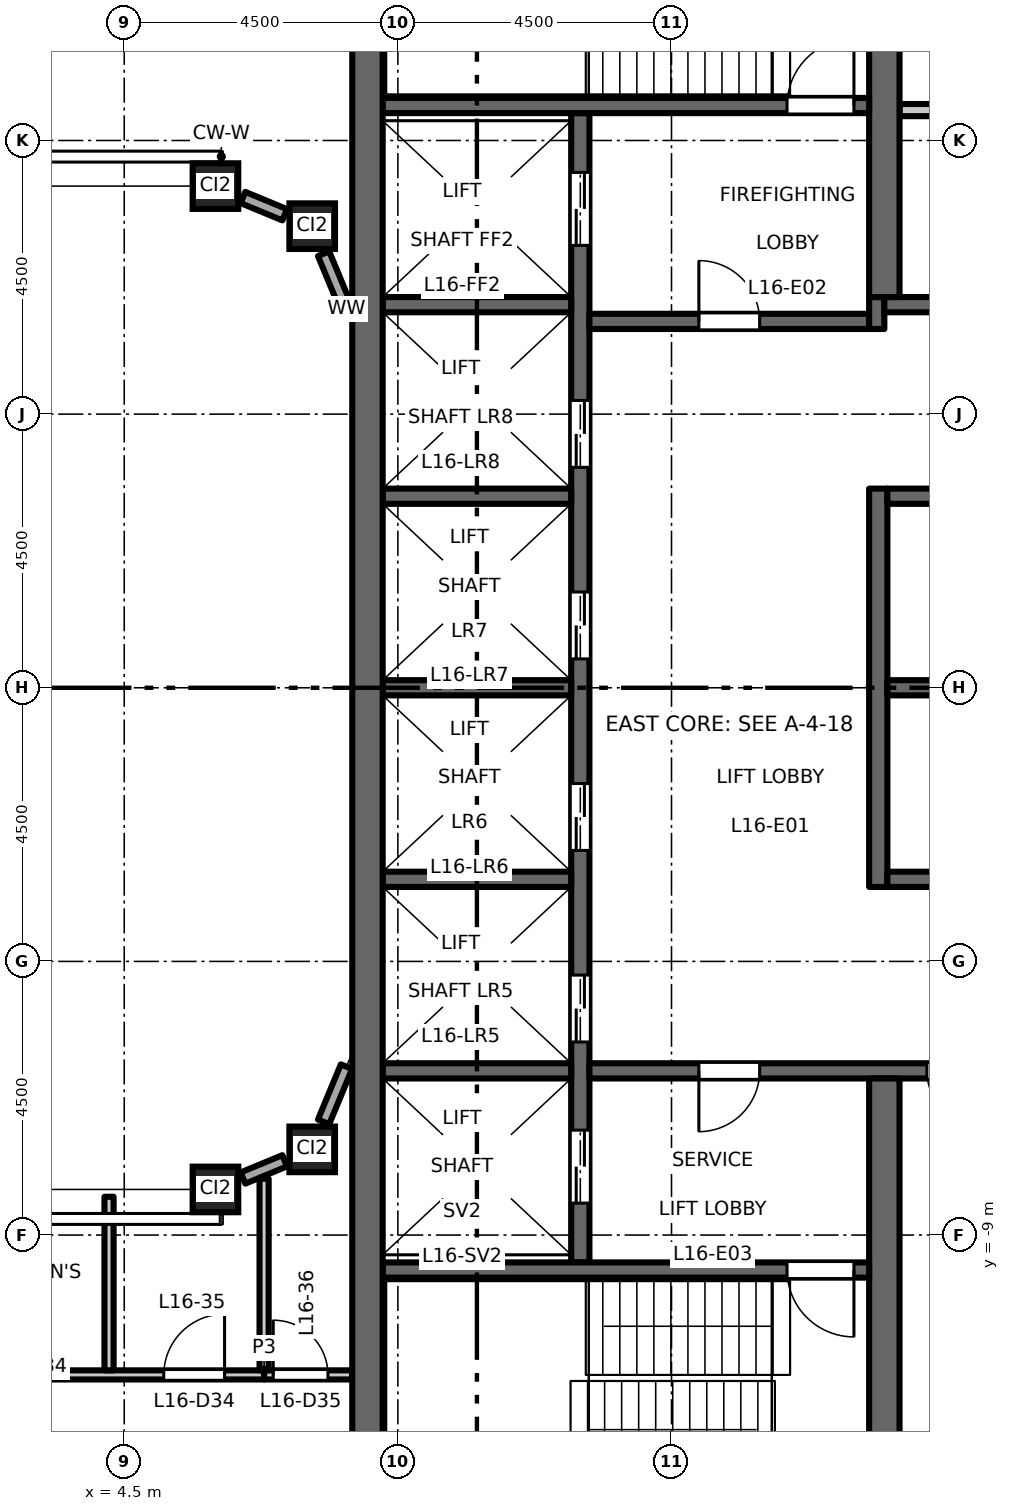
"""IFC4 building model, lengths in metres.
Left out: names, types, materials, properties, quantities, classifications, styles, units other than length and angle.
Written with IfcOpenShell. Run it as: python <this file> out.ifc"""

import sys

from ifc_helpers import new_model, si_unit, direction, frame, frame_2d, origin, origin_2d, place, context, subcontext, project, spatial, rectangle, hollow_rectangle, extrude, element, fill, save


model = new_model("IFC4")
c1 = context("Model", 3, precision=1e-05, world=origin(), true_north=direction((0.0, 1.0)))
c2 = subcontext(c1, "Body", "Model", "MODEL_VIEW")
j1 = project(units=[si_unit("LENGTHUNIT", "METRE"), si_unit("PLANEANGLEUNIT", "RADIAN")], contexts=[c1])
p1 = place(None, origin())
s1 = spatial("IfcSite", under=j1, at=p1, CompositionType="ELEMENT")
p2 = place(p1, origin())
s2 = spatial("IfcBuilding", under=s1, at=p2, CompositionType="ELEMENT")
p3 = place(p2, frame((0.0, 0.0, 76.2)))
s3 = spatial("IfcBuildingStorey", under=s2, at=p3, CompositionType="ELEMENT", Elevation=76.2)
for number, where, z_axis, x_axis in (
    (1, (6.0, -8.25, 0.0), (0.0, 0.0, 1.0), (1.0, 0.0, 0.0)),
    (2, (7.591, -7.591, 0.0), (0.0, 0.0, 1.0), (1.0, 0.0, 0.0)),
    (3, (6.0, 8.25, 0.0), (0.0, 0.0, 1.0), (1.0, 0.0, 0.0)),
    (4, (7.591, 7.591, 0.0), (0.0, 0.0, 1.0), (1.0, 0.0, 0.0)),
):
    element("IfcColumn", number, at=place(p3, frame(where, z_axis=z_axis, x_axis=x_axis)), inside=s3, PredefinedType="COLUMN", context=c2, shape_type="SweptSolid", body=[
        extrude(hollow_rectangle(XDim=0.75, YDim=0.75, WallThickness=0.045, at=origin_2d()), origin(), (0.0, 0.0, 1.0), 4.5),
    ])
p4 = place(p3, frame((12.0, -9.45, 0.0), z_axis=(0.0, 0.0, 1.0), x_axis=(0.0, 1.0, 0.0)))
e5 = element("IfcWall", 5, at=p4, inside=s3, PredefinedType="SHEAR", context=c2, shape_type="SweptSolid", body=[
    extrude(rectangle(XDim=18.9, YDim=0.3, at=frame_2d((9.45, 0.0))), origin(), (0.0, 0.0, 1.0), 4.35),
])
p5 = place(p4, frame((3.625, 0.0, 0.0)))
e6 = element("IfcOpeningElement", 6, at=p5, cuts=e5, PredefinedType="OPENING", context=c2, shape_type="SweptSolid", body=[
    extrude(rectangle(XDim=1.1, YDim=2.1, at=frame_2d((0.55, 1.05))), frame((0.0, 0.16, 0.0), z_axis=(0.0, -1.0, 0.0), x_axis=(1.0, 0.0, 0.0)), (0.0, 0.0, 1.0), 0.32),
])
p6 = place(p4, frame((6.775, 0.0, 0.0)))
e7 = element("IfcOpeningElement", 7, at=p6, cuts=e5, PredefinedType="OPENING", context=c2, shape_type="SweptSolid", body=[
    extrude(rectangle(XDim=1.1, YDim=2.1, at=frame_2d((0.55, 1.05))), frame((0.0, 0.16, 0.0), z_axis=(0.0, -1.0, 0.0), x_axis=(1.0, 0.0, 0.0)), (0.0, 0.0, 1.0), 0.32),
])
p7 = place(p4, frame((9.925, 0.0, 0.0)))
e8 = element("IfcOpeningElement", 8, at=p7, cuts=e5, PredefinedType="OPENING", context=c2, shape_type="SweptSolid", body=[
    extrude(rectangle(XDim=1.1, YDim=2.1, at=frame_2d((0.55, 1.05))), frame((0.0, 0.16, 0.0), z_axis=(0.0, -1.0, 0.0), x_axis=(1.0, 0.0, 0.0)), (0.0, 0.0, 1.0), 0.32),
])
p8 = place(p4, frame((13.075, 0.0, 0.0)))
e9 = element("IfcOpeningElement", 9, at=p8, cuts=e5, PredefinedType="OPENING", context=c2, shape_type="SweptSolid", body=[
    extrude(rectangle(XDim=1.1, YDim=2.1, at=frame_2d((0.55, 1.05))), frame((0.0, 0.16, 0.0), z_axis=(0.0, -1.0, 0.0), x_axis=(1.0, 0.0, 0.0)), (0.0, 0.0, 1.0), 0.32),
])
p9 = place(p4, frame((16.725, 0.0, 0.0)))
e10 = element("IfcOpeningElement", 10, at=p9, cuts=e5, PredefinedType="OPENING", context=c2, shape_type="SweptSolid", body=[
    extrude(rectangle(XDim=1.2, YDim=2.1, at=frame_2d((0.6, 1.05))), frame((0.0, 0.16, 0.0), z_axis=(0.0, -1.0, 0.0), x_axis=(1.0, 0.0, 0.0)), (0.0, 0.0, 1.0), 0.32),
])
p10 = place(p4, frame((0.975, 0.0, 0.0)))
e11 = element("IfcOpeningElement", 11, at=p10, cuts=e5, PredefinedType="OPENING", context=c2, shape_type="SweptSolid", body=[
    extrude(rectangle(XDim=1.2, YDim=2.1, at=frame_2d((0.6, 1.05))), frame((0.0, 0.16, 0.0), z_axis=(0.0, -1.0, 0.0), x_axis=(1.0, 0.0, 0.0)), (0.0, 0.0, 1.0), 0.32),
])
p11 = place(p3, frame((12.15, 6.025, 0.0), z_axis=(0.0, 0.0, 1.0), x_axis=(1.0, 0.0, 0.0)))
e12 = element("IfcWall", 12, at=p11, inside=s3, PredefinedType="SHEAR", context=c2, shape_type="SweptSolid", body=[
    extrude(rectangle(XDim=4.6, YDim=0.25, at=frame_2d((2.3, 0.0))), origin(), (0.0, 0.0, 1.0), 4.35),
])
p12 = place(p11, frame((1.8, 0.0, 0.0)))
e13 = element("IfcOpeningElement", 13, at=p12, cuts=e12, PredefinedType="OPENING", context=c2, shape_type="SweptSolid", body=[
    extrude(rectangle(XDim=1.0, YDim=2.1, at=frame_2d((0.5, 1.05))), frame((0.0, 0.135, 0.0), z_axis=(0.0, -1.0, 0.0), x_axis=(1.0, 0.0, 0.0)), (0.0, 0.0, 1.0), 0.27),
])
p13 = place(p3, frame((16.875, 5.9, 0.0), z_axis=(0.0, 0.0, 1.0), x_axis=(0.0, 1.0, 0.0)))
e14 = element("IfcWall", 14, at=p13, inside=s3, PredefinedType="SHEAR", context=c2, shape_type="SweptSolid", body=[
    extrude(rectangle(XDim=0.525, YDim=0.25, at=frame_2d((0.263, 0.0))), origin(), (0.0, 0.0, 1.0), 4.35),
])
p14 = place(p3, frame((17.0, 6.3, 0.0), z_axis=(0.0, 0.0, 1.0), x_axis=(1.0, 0.0, 0.0)))
e15 = element("IfcWall", 15, at=p14, inside=s3, PredefinedType="SHEAR", context=c2, shape_type="SweptSolid", body=[
    extrude(rectangle(XDim=4.25, YDim=0.25, at=frame_2d((2.125, 0.0))), origin(), (0.0, 0.0, 1.0), 4.35),
])
p15 = place(p14, frame((1.8, 0.0, 0.0)))
e16 = element("IfcOpeningElement", 16, at=p15, cuts=e15, PredefinedType="OPENING", context=c2, shape_type="SweptSolid", body=[
    extrude(rectangle(XDim=0.9, YDim=2.1, at=frame_2d((0.45, 1.05))), frame((0.0, 0.135, 0.0), z_axis=(0.0, -1.0, 0.0), x_axis=(1.0, 0.0, 0.0)), (0.0, 0.0, 1.0), 0.27),
])
p16 = place(p3, frame((12.15, -6.3, 0.0), z_axis=(0.0, 0.0, 1.0), x_axis=(1.0, 0.0, 0.0)))
e17 = element("IfcWall", 17, at=p16, inside=s3, PredefinedType="SHEAR", context=c2, shape_type="SweptSolid", body=[
    extrude(rectangle(XDim=9.1, YDim=0.25, at=frame_2d((4.55, 0.0))), origin(), (0.0, 0.0, 1.0), 4.35),
])
p17 = place(p16, frame((1.8, 0.0, 0.0)))
e18 = element("IfcOpeningElement", 18, at=p17, cuts=e17, PredefinedType="OPENING", context=c2, shape_type="SweptSolid", body=[
    extrude(rectangle(XDim=1.0, YDim=2.1, at=frame_2d((0.5, 1.05))), frame((0.0, 0.135, 0.0), z_axis=(0.0, -1.0, 0.0), x_axis=(1.0, 0.0, 0.0)), (0.0, 0.0, 1.0), 0.27),
])
p18 = place(p16, frame((5.55, 0.0, 0.0)))
e19 = element("IfcOpeningElement", 19, at=p18, cuts=e17, PredefinedType="OPENING", context=c2, shape_type="SweptSolid", body=[
    extrude(rectangle(XDim=0.9, YDim=2.1, at=frame_2d((0.45, 1.05))), frame((0.0, 0.135, 0.0), z_axis=(0.0, -1.0, 0.0), x_axis=(1.0, 0.0, 0.0)), (0.0, 0.0, 1.0), 0.27),
])
p19 = place(p16, frame((7.55, 0.0, 0.0)))
e20 = element("IfcOpeningElement", 20, at=p19, cuts=e17, PredefinedType="OPENING", context=c2, shape_type="SweptSolid", body=[
    extrude(rectangle(XDim=0.9, YDim=2.1, at=frame_2d((0.45, 1.05))), frame((0.0, 0.135, 0.0), z_axis=(0.0, -1.0, 0.0), x_axis=(1.0, 0.0, 0.0)), (0.0, 0.0, 1.0), 0.27),
])
p20 = place(p3, frame((17.25, 9.5, 0.0), z_axis=(0.0, 0.0, 1.0), x_axis=(1.0, 0.0, 0.0)))
e21 = element("IfcWall", 21, at=p20, inside=s3, PredefinedType="PARTITIONING", context=c2, shape_type="SweptSolid", body=[
    extrude(rectangle(XDim=4.0, YDim=0.2, at=frame_2d((2.0, 0.0))), origin(), (0.0, 0.0, 1.0), 4.35),
])
p21 = place(p3, frame((16.9, -3.275, 0.0), z_axis=(0.0, 0.0, 1.0), x_axis=(0.0, 1.0, 0.0)))
e22 = element("IfcWall", 22, at=p21, inside=s3, PredefinedType="SHEAR", context=c2, shape_type="SweptSolid", body=[
    extrude(rectangle(XDim=6.55, YDim=0.3, at=frame_2d((3.275, 0.0))), origin(), (0.0, 0.0, 1.0), 4.35),
])
for number, where, z_axis, x_axis in (
    (23, (17.05, 0.0, 0.0), (0.0, 0.0, 1.0), (1.0, 0.0, 0.0)),
    (24, (17.05, 3.15, 0.0), (0.0, 0.0, 1.0), (1.0, 0.0, 0.0)),
    (25, (17.05, -3.15, 0.0), (0.0, 0.0, 1.0), (1.0, 0.0, 0.0)),
):
    element("IfcWall", number, at=place(p3, frame(where, z_axis=z_axis, x_axis=x_axis)), inside=s3, PredefinedType="SHEAR", context=c2, shape_type="SweptSolid", body=[
        extrude(rectangle(XDim=4.2, YDim=0.25, at=frame_2d((2.1, 0.0))), origin(), (0.0, 0.0, 1.0), 4.35),
    ])
for number, where, z_axis, x_axis in (
    (26, (17.0, 6.425, 0.0), (0.0, 0.0, 1.0), (0.0, 1.0, 0.0)),
    (27, (17.0, -13.0, 0.0), (0.0, 0.0, 1.0), (0.0, 1.0, 0.0)),
):
    element("IfcWall", number, at=place(p3, frame(where, z_axis=z_axis, x_axis=x_axis)), inside=s3, PredefinedType="SHEAR", context=c2, shape_type="SweptSolid", body=[
        extrude(rectangle(XDim=6.575, YDim=0.5, at=frame_2d((3.288, 0.0))), origin(), (0.0, 0.0, 1.0), 4.35),
    ])
for number, where, z_axis, x_axis in (
    (28, (8.75, 0.0, 0.0), (0.0, 0.0, 1.0), (1.0, 0.0, 0.0)),
    (29, (8.75, 3.15, 0.0), (0.0, 0.0, 1.0), (1.0, 0.0, 0.0)),
    (30, (8.75, 6.3, 0.0), (0.0, 0.0, 1.0), (1.0, 0.0, 0.0)),
    (31, (8.75, -3.15, 0.0), (0.0, 0.0, 1.0), (1.0, 0.0, 0.0)),
    (32, (8.75, -6.3, 0.0), (0.0, 0.0, 1.0), (1.0, 0.0, 0.0)),
):
    element("IfcWall", number, at=place(p3, frame(where, z_axis=z_axis, x_axis=x_axis)), inside=s3, PredefinedType="SHEAR", context=c2, shape_type="SweptSolid", body=[
        extrude(rectangle(XDim=3.1, YDim=0.25, at=frame_2d((1.55, 0.0))), origin(), (0.0, 0.0, 1.0), 4.35),
    ])
p22 = place(p3, frame((8.75, 9.575, 0.0), z_axis=(0.0, 0.0, 1.0), x_axis=(1.0, 0.0, 0.0)))
e33 = element("IfcWall", 33, at=p22, inside=s3, PredefinedType="SHEAR", context=c2, shape_type="SweptSolid", body=[
    extrude(rectangle(XDim=8.0, YDim=0.25, at=frame_2d((4.0, 0.0))), origin(), (0.0, 0.0, 1.0), 4.35),
])
p23 = place(p22, frame((6.65, 0.0, 0.0)))
e34 = element("IfcOpeningElement", 34, at=p23, cuts=e33, PredefinedType="OPENING", context=c2, shape_type="SweptSolid", body=[
    extrude(rectangle(XDim=1.1, YDim=2.1, at=frame_2d((0.55, 1.05))), frame((0.0, 0.135, 0.0), z_axis=(0.0, -1.0, 0.0), x_axis=(1.0, 0.0, 0.0)), (0.0, 0.0, 1.0), 0.27),
])
p24 = place(p3, frame((8.75, -9.575, 0.0), z_axis=(0.0, 0.0, 1.0), x_axis=(1.0, 0.0, 0.0)))
e35 = element("IfcWall", 35, at=p24, inside=s3, PredefinedType="SHEAR", context=c2, shape_type="SweptSolid", body=[
    extrude(rectangle(XDim=8.0, YDim=0.25, at=frame_2d((4.0, 0.0))), origin(), (0.0, 0.0, 1.0), 4.35),
])
p25 = place(p24, frame((6.65, 0.0, 0.0)))
e36 = element("IfcOpeningElement", 36, at=p25, cuts=e35, PredefinedType="OPENING", context=c2, shape_type="SweptSolid", body=[
    extrude(rectangle(XDim=1.1, YDim=2.1, at=frame_2d((0.55, 1.05))), frame((0.0, 0.135, 0.0), z_axis=(0.0, -1.0, 0.0), x_axis=(1.0, 0.0, 0.0)), (0.0, 0.0, 1.0), 0.27),
])
p26 = place(p3, frame((8.5, -13.0, 0.0), z_axis=(0.0, 0.0, 1.0), x_axis=(0.0, 1.0, 0.0)))
e37 = element("IfcWall", 37, at=p26, inside=s3, PredefinedType="SHEAR", context=c2, shape_type="SweptSolid", body=[
    extrude(rectangle(XDim=26.0, YDim=0.5, at=frame_2d((13.0, 0.0))), origin(), (0.0, 0.0, 1.0), 4.35),
])
p27 = place(p3, frame((6.453, -8.062, 0.0), z_axis=(0.0, 0.0, 1.0), x_axis=(0.923940677943, 0.382535780864, 0.0)))
e38 = element("IfcWall", 38, at=p27, inside=s3, PredefinedType="STANDARD", context=c2, shape_type="SweptSolid", body=[
    extrude(rectangle(XDim=0.742, YDim=0.2, at=frame_2d((0.371, 0.0))), origin(), (0.0, 0.0, 1.0), 3.73),
])
for number, where, z_axis, x_axis in (
    (39, (7.779, -7.138, 0.0), (0.0, 0.0, 1.0), (0.383, 0.924, 0.0)),
    (40, (8.154, 6.231, 0.0), (0.0, 0.0, 1.0), (-0.383, 0.924, 0.0)),
):
    element("IfcWall", number, at=place(p3, frame(where, z_axis=z_axis, x_axis=x_axis)), inside=s3, PredefinedType="STANDARD", context=c2, shape_type="SweptSolid", body=[
        extrude(rectangle(XDim=0.982, YDim=0.2, at=frame_2d((0.491, 0.0))), origin(), (0.0, 0.0, 1.0), 3.73),
    ])
p28 = place(p3, frame((7.138, 7.779, 0.0), z_axis=(0.0, 0.0, 1.0), x_axis=(-0.923940677943, 0.382535780864, 0.0)))
e41 = element("IfcWall", 41, at=p28, inside=s3, PredefinedType="STANDARD", context=c2, shape_type="SweptSolid", body=[
    extrude(rectangle(XDim=0.742, YDim=0.2, at=frame_2d((0.371, 0.0))), origin(), (0.0, 0.0, 1.0), 3.73),
])
p29 = place(p3, frame((-8.25, -11.3, 0.0), z_axis=(0.0, 0.0, 1.0), x_axis=(1.0, 0.0, 0.0)))
e42 = element("IfcWall", 42, at=p29, inside=s3, PredefinedType="PARTITIONING", context=c2, shape_type="SweptSolid", body=[
    extrude(rectangle(XDim=15.05, YDim=0.15, at=frame_2d((7.525, 0.0))), origin(), (0.0, 0.0, 1.0), 4.35),
])
p30 = place(p29, frame((2.6, 0.0, 0.0)))
e43 = element("IfcOpeningElement", 43, at=p30, cuts=e42, PredefinedType="OPENING", context=c2, shape_type="SweptSolid", body=[
    extrude(rectangle(XDim=1.0, YDim=2.1, at=frame_2d((0.5, 1.05))), frame((0.0, 0.085, 0.0), z_axis=(0.0, -1.0, 0.0), x_axis=(1.0, 0.0, 0.0)), (0.0, 0.0, 1.0), 0.17),
])
p31 = place(p29, frame((8.85, 0.0, 0.0)))
e44 = element("IfcOpeningElement", 44, at=p31, cuts=e42, PredefinedType="OPENING", context=c2, shape_type="SweptSolid", body=[
    extrude(rectangle(XDim=1.0, YDim=2.1, at=frame_2d((0.5, 1.05))), frame((0.0, 0.085, 0.0), z_axis=(0.0, -1.0, 0.0), x_axis=(1.0, 0.0, 0.0)), (0.0, 0.0, 1.0), 0.17),
])
p32 = place(p29, frame((13.4, 0.0, 0.0)))
e45 = element("IfcOpeningElement", 45, at=p32, cuts=e42, PredefinedType="OPENING", context=c2, shape_type="SweptSolid", body=[
    extrude(rectangle(XDim=1.0, YDim=2.1, at=frame_2d((0.5, 1.05))), frame((0.0, 0.085, 0.0), z_axis=(0.0, -1.0, 0.0), x_axis=(1.0, 0.0, 0.0)), (0.0, 0.0, 1.0), 0.17),
])
p33 = place(p3, frame((6.8, -11.3, 0.0), z_axis=(0.0, 0.0, 1.0), x_axis=(1.0, 0.0, 0.0)))
e46 = element("IfcWall", 46, at=p33, inside=s3, PredefinedType="PARTITIONING", context=c2, shape_type="SweptSolid", body=[
    extrude(rectangle(XDim=1.45, YDim=0.15, at=frame_2d((0.725, 0.0))), origin(), (0.0, 0.0, 1.0), 4.35),
])
p34 = place(p33, frame((0.15, 0.0, 0.0)))
e47 = element("IfcOpeningElement", 47, at=p34, cuts=e46, PredefinedType="OPENING", context=c2, shape_type="SweptSolid", body=[
    extrude(rectangle(XDim=0.9, YDim=2.1, at=frame_2d((0.45, 1.05))), frame((0.0, 0.085, 0.0), z_axis=(0.0, -1.0, 0.0), x_axis=(1.0, 0.0, 0.0)), (0.0, 0.0, 1.0), 0.17),
])
p35 = place(p3, frame((4.25, -11.225, 0.0), z_axis=(0.0, 0.0, 1.0), x_axis=(0.0, 1.0, 0.0)))
e48 = element("IfcWall", 48, at=p35, inside=s3, PredefinedType="PARTITIONING", context=c2, shape_type="SweptSolid", body=[
    extrude(rectangle(XDim=2.855, YDim=0.15, at=frame_2d((1.427, 0.0))), origin(), (0.0, 0.0, 1.0), 4.35),
])
p36 = place(p3, frame((6.8, -11.225, 0.0), z_axis=(0.0, 0.0, 1.0), x_axis=(0.0, 1.0, 0.0)))
e49 = element("IfcWall", 49, at=p36, inside=s3, PredefinedType="PARTITIONING", context=c2, shape_type="SweptSolid", body=[
    extrude(rectangle(XDim=3.151, YDim=0.15, at=frame_2d((1.576, 0.0))), origin(), (0.0, 0.0, 1.0), 4.35),
])
p37 = place(p12, origin())
e50 = element("IfcDoor", 50, at=p37, inside=s3, OperationType="SINGLE_SWING_RIGHT", PredefinedType="DOOR", context=c2, shape_type="SweptSolid", body=[
    extrude(rectangle(XDim=1.0, YDim=2.1, at=frame_2d((0.5, 1.05))), frame((0.0, 0.025, 0.0), z_axis=(0.0, -1.0, 0.0), x_axis=(1.0, 0.0, 0.0)), (0.0, 0.0, 1.0), 0.05),
])
fill(e13, e50)
p38 = place(p17, origin())
e51 = element("IfcDoor", 51, at=p38, inside=s3, OperationType="SINGLE_SWING_LEFT", PredefinedType="DOOR", context=c2, shape_type="SweptSolid", body=[
    extrude(rectangle(XDim=1.0, YDim=2.1, at=frame_2d((0.5, 1.05))), frame((0.0, 0.025, 0.0), z_axis=(0.0, -1.0, 0.0), x_axis=(1.0, 0.0, 0.0)), (0.0, 0.0, 1.0), 0.05),
])
fill(e18, e51)
p39 = place(p23, origin())
e52 = element("IfcDoor", 52, at=p39, inside=s3, OperationType="SINGLE_SWING_LEFT", PredefinedType="DOOR", context=c2, shape_type="SweptSolid", body=[
    extrude(rectangle(XDim=1.1, YDim=2.1, at=frame_2d((0.55, 1.05))), frame((0.0, 0.025, 0.0), z_axis=(0.0, -1.0, 0.0), x_axis=(1.0, 0.0, 0.0)), (0.0, 0.0, 1.0), 0.05),
])
fill(e34, e52)
p40 = place(p25, origin())
e53 = element("IfcDoor", 53, at=p40, inside=s3, OperationType="SINGLE_SWING_RIGHT", PredefinedType="DOOR", context=c2, shape_type="SweptSolid", body=[
    extrude(rectangle(XDim=1.1, YDim=2.1, at=frame_2d((0.55, 1.05))), frame((0.0, 0.025, 0.0), z_axis=(0.0, -1.0, 0.0), x_axis=(1.0, 0.0, 0.0)), (0.0, 0.0, 1.0), 0.05),
])
fill(e36, e53)
p41 = place(p5, origin())
e54 = element("IfcDoor", 54, at=p41, inside=s3, OperationType="DOUBLE_DOOR_SLIDING", PredefinedType="DOOR", context=c2, shape_type="SweptSolid", body=[
    extrude(rectangle(XDim=1.1, YDim=2.1, at=frame_2d((0.55, 1.05))), frame((0.0, 0.025, 0.0), z_axis=(0.0, -1.0, 0.0), x_axis=(1.0, 0.0, 0.0)), (0.0, 0.0, 1.0), 0.05),
])
fill(e6, e54)
p42 = place(p6, origin())
e55 = element("IfcDoor", 55, at=p42, inside=s3, OperationType="DOUBLE_DOOR_SLIDING", PredefinedType="DOOR", context=c2, shape_type="SweptSolid", body=[
    extrude(rectangle(XDim=1.1, YDim=2.1, at=frame_2d((0.55, 1.05))), frame((0.0, 0.025, 0.0), z_axis=(0.0, -1.0, 0.0), x_axis=(1.0, 0.0, 0.0)), (0.0, 0.0, 1.0), 0.05),
])
fill(e7, e55)
p43 = place(p7, origin())
e56 = element("IfcDoor", 56, at=p43, inside=s3, OperationType="DOUBLE_DOOR_SLIDING", PredefinedType="DOOR", context=c2, shape_type="SweptSolid", body=[
    extrude(rectangle(XDim=1.1, YDim=2.1, at=frame_2d((0.55, 1.05))), frame((0.0, 0.025, 0.0), z_axis=(0.0, -1.0, 0.0), x_axis=(1.0, 0.0, 0.0)), (0.0, 0.0, 1.0), 0.05),
])
fill(e8, e56)
p44 = place(p8, origin())
e57 = element("IfcDoor", 57, at=p44, inside=s3, OperationType="DOUBLE_DOOR_SLIDING", PredefinedType="DOOR", context=c2, shape_type="SweptSolid", body=[
    extrude(rectangle(XDim=1.1, YDim=2.1, at=frame_2d((0.55, 1.05))), frame((0.0, 0.025, 0.0), z_axis=(0.0, -1.0, 0.0), x_axis=(1.0, 0.0, 0.0)), (0.0, 0.0, 1.0), 0.05),
])
fill(e9, e57)
p45 = place(p9, origin())
e58 = element("IfcDoor", 58, at=p45, inside=s3, OperationType="DOUBLE_DOOR_SLIDING", PredefinedType="DOOR", context=c2, shape_type="SweptSolid", body=[
    extrude(rectangle(XDim=1.2, YDim=2.1, at=frame_2d((0.6, 1.05))), frame((0.0, 0.025, 0.0), z_axis=(0.0, -1.0, 0.0), x_axis=(1.0, 0.0, 0.0)), (0.0, 0.0, 1.0), 0.05),
])
fill(e10, e58)
p46 = place(p10, origin())
e59 = element("IfcDoor", 59, at=p46, inside=s3, OperationType="DOUBLE_DOOR_SLIDING", PredefinedType="DOOR", context=c2, shape_type="SweptSolid", body=[
    extrude(rectangle(XDim=1.2, YDim=2.1, at=frame_2d((0.6, 1.05))), frame((0.0, 0.025, 0.0), z_axis=(0.0, -1.0, 0.0), x_axis=(1.0, 0.0, 0.0)), (0.0, 0.0, 1.0), 0.05),
])
fill(e11, e59)
p47 = place(p18, origin())
e60 = element("IfcDoor", 60, at=p47, inside=s3, OperationType="SINGLE_SWING_RIGHT", PredefinedType="DOOR", context=c2, shape_type="SweptSolid", body=[
    extrude(rectangle(XDim=0.9, YDim=2.1, at=frame_2d((0.45, 1.05))), frame((0.0, 0.025, 0.0), z_axis=(0.0, -1.0, 0.0), x_axis=(1.0, 0.0, 0.0)), (0.0, 0.0, 1.0), 0.05),
])
fill(e19, e60)
p48 = place(p32, origin())
e61 = element("IfcDoor", 61, at=p48, inside=s3, OperationType="SINGLE_SWING_RIGHT", PredefinedType="DOOR", context=c2, shape_type="SweptSolid", body=[
    extrude(rectangle(XDim=1.0, YDim=2.1, at=frame_2d((0.5, 1.05))), frame((0.0, 0.025, 0.0), z_axis=(0.0, -1.0, 0.0), x_axis=(1.0, 0.0, 0.0)), (0.0, 0.0, 1.0), 0.05),
])
fill(e45, e61)
p49 = place(p34, origin())
e62 = element("IfcDoor", 62, at=p49, inside=s3, OperationType="SINGLE_SWING_LEFT", PredefinedType="DOOR", context=c2, shape_type="SweptSolid", body=[
    extrude(rectangle(XDim=0.9, YDim=2.1, at=frame_2d((0.45, 1.05))), frame((0.0, 0.025, 0.0), z_axis=(0.0, -1.0, 0.0), x_axis=(1.0, 0.0, 0.0)), (0.0, 0.0, 1.0), 0.05),
])
fill(e47, e62)
save(model, sys.argv[1])
